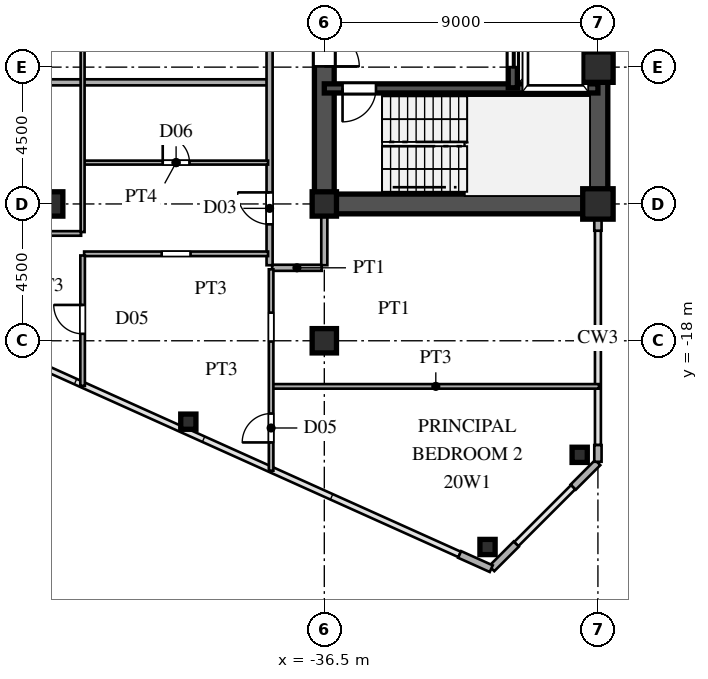
"""IFC4 building model, lengths in metres.
Left out: names, types, materials, properties, quantities, classifications, styles, units other than length and angle.
Written with IfcOpenShell. Run it as: python <this file> out.ifc"""

import sys

from ifc_helpers import new_model, si_unit, direction, frame, frame_2d, origin, origin_2d, place, context, subcontext, project, spatial, rectangle, hollow_rectangle, i_section, extrude, source, transform, mapped, element, fill, save


model = new_model("IFC4")
c1 = context("Model", 3, precision=1e-05, world=origin(), true_north=direction((0.0, 1.0)))
c2 = subcontext(c1, "Body", "Model", "MODEL_VIEW")
j1 = project(units=[si_unit("LENGTHUNIT", "METRE"), si_unit("PLANEANGLEUNIT", "RADIAN")], contexts=[c1])
p1 = place(None, origin())
s1 = spatial("IfcSite", under=j1, at=p1, CompositionType="ELEMENT")
p2 = place(p1, origin())
s2 = spatial("IfcBuilding", under=s1, at=p2, CompositionType="ELEMENT")
p3 = place(p2, frame((0.0, 0.0, 76.5)))
s3 = spatial("IfcBuildingStorey", under=s2, at=p3, CompositionType="ELEMENT", Elevation=76.5)
m1 = source(origin(), c2, "Body", "SweptSolid", [
    extrude(hollow_rectangle(XDim=1.0, YDim=1.0, WallThickness=0.042, at=origin_2d()), origin(), (0.0, 0.0, 1.0), 3.6),
])
for number, where, z_axis, x_axis in (
    (1, (-27.5, -13.5, 0.0), (0.0, 0.0, 1.0), (1.0, 0.0, 0.0)),
    (2, (-27.5, -9.0, 0.0), (0.0, 0.0, 1.0), (1.0, 0.0, 0.0)),
):
    element("IfcColumn", number, at=place(p3, frame(where, z_axis=z_axis, x_axis=x_axis)), inside=s3, PredefinedType="COLUMN", context=c2, shape_type="MappedRepresentation", body=[
        mapped(m1, transform((0.0, 0.0, 0.0), scale=1.0)),
    ])
m2 = source(origin(), c2, "Body", "SweptSolid", [
    extrude(i_section(OverallWidth=0.8, OverallDepth=0.8, WebThickness=0.032, FlangeThickness=0.05, at=origin_2d()), origin(), (0.0, 0.0, 1.0), 3.6),
])
for number, where, z_axis, x_axis in (
    (3, (-36.5, -18.0, 0.0), (0.0, 0.0, 1.0), (1.0, 0.0, 0.0)),
    (4, (-36.5, -13.5, 0.0), (0.0, 0.0, 1.0), (1.0, 0.0, 0.0)),
    (5, (-45.5, -13.5, 0.0), (0.0, 0.0, 1.0), (1.0, 0.0, 0.0)),
):
    element("IfcColumn", number, at=place(p3, frame(where, z_axis=z_axis, x_axis=x_axis)), inside=s3, PredefinedType="COLUMN", context=c2, shape_type="MappedRepresentation", body=[
        mapped(m2, transform((0.0, 0.0, 0.0), scale=1.0)),
    ])
m3 = source(origin(), c2, "Body", "SweptSolid", [
    extrude(hollow_rectangle(XDim=0.5, YDim=0.5, WallThickness=0.02, at=origin_2d()), origin(), (0.0, 0.0, 1.0), 3.6),
])
for number, where, z_axis, x_axis in (
    (6, (-28.1, -21.751, 0.0), (0.0, 0.0, 1.0), (1.0, 0.0, 0.0)),
    (7, (-31.131, -24.783, 0.0), (0.0, 0.0, 1.0), (1.0, 0.0, 0.0)),
    (8, (-40.973, -20.661, 0.0), (0.0, 0.0, 1.0), (1.0, 0.0, 0.0)),
):
    element("IfcColumn", number, at=place(p3, frame(where, z_axis=z_axis, x_axis=x_axis)), inside=s3, PredefinedType="COLUMN", context=c2, shape_type="MappedRepresentation", body=[
        mapped(m3, transform((0.0, 0.0, 0.0), scale=1.0)),
    ])
p4 = place(p3, frame((-27.5, -21.98, 0.0), z_axis=(0.0, 0.0, 1.0), x_axis=(0.0, 1.0, 0.0)))
e9 = element("IfcWall", 9, at=p4, inside=s3, PredefinedType="SOLIDWALL", context=c2, shape_type="SweptSolid", body=[
    extrude(rectangle(XDim=0.55, YDim=0.24, at=frame_2d((0.275, 0.0))), origin(), (0.0, 0.0, 1.0), 3.38),
])
p5 = place(p3, frame((-27.5, -14.38, 0.0), z_axis=(0.0, 0.0, 1.0), x_axis=(0.0, 1.0, 0.0)))
e10 = element("IfcWall", 10, at=p5, inside=s3, PredefinedType="SOLIDWALL", context=c2, shape_type="SweptSolid", body=[
    extrude(rectangle(XDim=0.55, YDim=0.24, at=frame_2d((0.275, 0.0))), origin(), (0.0, 0.0, 1.0), 2.88),
])
p6 = place(p3, frame((-32.049, -25.028, 0.0), z_axis=(0.0, 0.0, 1.0), x_axis=(0.911929519623, -0.410346866979, 0.0)))
e11 = element("IfcWall", 11, at=p6, inside=s3, PredefinedType="SOLIDWALL", context=c2, shape_type="SweptSolid", body=[
    extrude(rectangle(XDim=1.14, YDim=0.24, at=frame_2d((0.57, 0.0))), origin(), (0.0, 0.0, 1.0), 3.38),
])
for number, where, z_axis, x_axis in (
    (12, (-30.993, -25.493, 0.0), (0.0, 0.0, 1.0), (0.707, 0.707, 0.0)),
    (13, (-28.313, -22.813, 0.0), (0.0, 0.0, 1.0), (0.707, 0.707, 0.0)),
):
    element("IfcWall", number, at=place(p3, frame(where, z_axis=z_axis, x_axis=x_axis)), inside=s3, PredefinedType="SOLIDWALL", context=c2, shape_type="SweptSolid", body=[
        extrude(rectangle(XDim=1.14, YDim=0.24, at=frame_2d((0.57, 0.0))), origin(), (0.0, 0.0, 1.0), 3.38),
    ])
p7 = place(p3, frame((-27.5, -13.5, 0.0), z_axis=(0.0, 0.0, 1.0), x_axis=(0.0, 1.0, 0.0)))
e14 = element("IfcWall", 14, at=p7, inside=s3, PredefinedType="SHEAR", context=c2, shape_type="SweptSolid", body=[
    extrude(rectangle(XDim=12.2, YDim=0.65, at=frame_2d((6.1, 0.0))), origin(), (0.0, 0.0, 1.0), 3.38),
])
p8 = place(p3, frame((-36.5, -13.5, 0.0), z_axis=(0.0, 0.0, 1.0), x_axis=(1.0, 0.0, 0.0)))
e15 = element("IfcWall", 15, at=p8, inside=s3, PredefinedType="SHEAR", context=c2, shape_type="SweptSolid", body=[
    extrude(rectangle(XDim=9.0, YDim=0.65, at=frame_2d((4.5, 0.0))), origin(), (0.0, 0.0, 1.0), 3.38),
])
p9 = place(p3, frame((-36.5, -13.65, 0.0), z_axis=(0.0, 0.0, 1.0), x_axis=(0.0, 1.0, 0.0)))
e16 = element("IfcWall", 16, at=p9, inside=s3, PredefinedType="SHEAR", context=c2, shape_type="SweptSolid", body=[
    extrude(rectangle(XDim=7.15, YDim=0.65, at=frame_2d((3.575, 0.0))), origin(), (0.0, 0.0, 1.0), 3.38),
])
p10 = place(p9, frame((4.675, 0.0, 0.0)))
e17 = element("IfcOpeningElement", 17, at=p10, cuts=e16, PredefinedType="OPENING", context=c2, shape_type="SweptSolid", body=[
    extrude(rectangle(XDim=1.15, YDim=2.2, at=frame_2d((0.575, 1.1))), frame((0.0, 0.335, 0.0), z_axis=(0.0, -1.0, 0.0), x_axis=(1.0, 0.0, 0.0)), (0.0, 0.0, 1.0), 0.67),
])
p11 = place(p3, frame((-36.5, -9.7, 0.0), z_axis=(0.0, 0.0, 1.0), x_axis=(1.0, 0.0, 0.0)))
e18 = element("IfcWall", 18, at=p11, inside=s3, PredefinedType="SHEAR", context=c2, shape_type="SweptSolid", body=[
    extrude(rectangle(XDim=9.0, YDim=0.3, at=frame_2d((4.5, 0.0))), origin(), (0.0, 0.0, 1.0), 3.38),
])
p12 = place(p11, frame((0.6, 0.0, 0.0)))
e19 = element("IfcOpeningElement", 19, at=p12, cuts=e18, PredefinedType="OPENING", context=c2, shape_type="SweptSolid", body=[
    extrude(rectangle(XDim=1.1, YDim=2.2, at=frame_2d((0.55, 1.1))), frame((0.0, 0.16, 0.0), z_axis=(0.0, -1.0, 0.0), x_axis=(1.0, 0.0, 0.0)), (0.0, 0.0, 1.0), 0.32),
])
p13 = place(p3, frame((-30.3, -9.68, 0.0), z_axis=(0.0, 0.0, 1.0), x_axis=(0.0, 1.0, 0.0)))
e20 = element("IfcWall", 20, at=p13, inside=s3, PredefinedType="SHEAR", context=c2, shape_type="SweptSolid", body=[
    extrude(rectangle(XDim=2.56, YDim=0.3, at=frame_2d((1.28, 0.0))), origin(), (0.0, 0.0, 1.0), 3.38),
])
p14 = place(p13, frame((0.68, 0.0, 0.0)))
e21 = element("IfcOpeningElement", 21, at=p14, cuts=e20, PredefinedType="OPENING", context=c2, shape_type="SweptSolid", body=[
    extrude(rectangle(XDim=1.2, YDim=2.25, at=frame_2d((0.6, 1.125))), frame((0.0, 0.16, 0.0), z_axis=(0.0, -1.0, 0.0), x_axis=(1.0, 0.0, 0.0)), (0.0, 0.0, 1.0), 0.32),
])
p15 = place(p3, frame((-38.2, -19.5, 0.0), z_axis=(0.0, 0.0, 1.0), x_axis=(1.0, 0.0, 0.0)))
e22 = element("IfcWall", 22, at=p15, inside=s3, PredefinedType="PARTITIONING", context=c2, shape_type="SweptSolid", body=[
    extrude(rectangle(XDim=10.735, YDim=0.15, at=frame_2d((5.367, 0.0))), origin(), (0.0, 0.0, 1.0), 3.38),
])
p16 = place(p3, frame((-38.215, -15.6, 0.0), z_axis=(0.0, 0.0, 1.0), x_axis=(1.0, 0.0, 0.0)))
e23 = element("IfcWall", 23, at=p16, inside=s3, PredefinedType="PARTITIONING", context=c2, shape_type="SweptSolid", body=[
    extrude(rectangle(XDim=1.63, YDim=0.2, at=frame_2d((0.815, 0.0))), origin(), (0.0, 0.0, 1.0), 3.38),
])
p17 = place(p3, frame((-44.4, -15.14, 0.0), z_axis=(0.0, 0.0, 1.0), x_axis=(1.0, 0.0, 0.0)))
e24 = element("IfcWall", 24, at=p17, inside=s3, PredefinedType="PARTITIONING", context=c2, shape_type="SweptSolid", body=[
    extrude(rectangle(XDim=6.05, YDim=0.15, at=frame_2d((3.025, 0.0))), origin(), (0.0, 0.0, 1.0), 3.38),
])
p18 = place(p17, frame((2.55, 0.0, 0.0)))
e25 = element("IfcOpeningElement", 25, at=p18, cuts=e24, PredefinedType="OPENING", context=c2, shape_type="SweptSolid", body=[
    extrude(rectangle(XDim=0.95, YDim=2.15, at=frame_2d((0.475, 1.075))), frame((0.0, 0.085, 0.0), z_axis=(0.0, -1.0, 0.0), x_axis=(1.0, 0.0, 0.0)), (0.0, 0.0, 1.0), 0.17),
])
p19 = place(p3, frame((-54.45, -14.47, 0.0), z_axis=(0.0, 0.0, 1.0), x_axis=(1.0, 0.0, 0.0)))
e26 = element("IfcWall", 26, at=p19, inside=s3, PredefinedType="PARTITIONING", context=c2, shape_type="SweptSolid", body=[
    extrude(rectangle(XDim=9.95, YDim=0.15, at=frame_2d((4.975, 0.0))), origin(), (0.0, 0.0, 1.0), 3.38),
])
p20 = place(p19, frame((4.5, 0.0, 0.0)))
e27 = element("IfcOpeningElement", 27, at=p20, cuts=e26, PredefinedType="OPENING", context=c2, shape_type="SweptSolid", body=[
    extrude(rectangle(XDim=0.95, YDim=2.15, at=frame_2d((0.475, 1.075))), frame((0.0, 0.085, 0.0), z_axis=(0.0, -1.0, 0.0), x_axis=(1.0, 0.0, 0.0)), (0.0, 0.0, 1.0), 0.17),
])
p21 = place(p3, frame((-44.4, -12.14, 0.0), z_axis=(0.0, 0.0, 1.0), x_axis=(1.0, 0.0, 0.0)))
e28 = element("IfcWall", 28, at=p21, inside=s3, PredefinedType="PARTITIONING", context=c2, shape_type="SweptSolid", body=[
    extrude(rectangle(XDim=6.05, YDim=0.13, at=frame_2d((3.025, 0.0))), origin(), (0.0, 0.0, 1.0), 3.38),
])
p22 = place(p21, frame((2.585, 0.0, 0.0)))
e29 = element("IfcOpeningElement", 29, at=p22, cuts=e28, PredefinedType="OPENING", context=c2, shape_type="SweptSolid", body=[
    extrude(rectangle(XDim=0.88, YDim=2.1, at=frame_2d((0.44, 1.05))), frame((0.0, 0.075, 0.0), z_axis=(0.0, -1.0, 0.0), x_axis=(1.0, 0.0, 0.0)), (0.0, 0.0, 1.0), 0.15),
])
p23 = place(p3, frame((-66.568, -9.5, 0.0), z_axis=(0.0, 0.0, 1.0), x_axis=(1.0, 0.0, 0.0)))
e30 = element("IfcWall", 30, at=p23, inside=s3, PredefinedType="PARTITIONING", context=c2, shape_type="SweptSolid", body=[
    extrude(rectangle(XDim=28.188, YDim=0.2, at=frame_2d((14.094, 0.0))), origin(), (0.0, 0.0, 1.0), 3.38),
])
p24 = place(p3, frame((-44.45, -19.483, 0.0), z_axis=(0.0, 0.0, 1.0), x_axis=(0.0, 1.0, 0.0)))
e31 = element("IfcWall", 31, at=p24, inside=s3, PredefinedType="PARTITIONING", context=c2, shape_type="SweptSolid", body=[
    extrude(rectangle(XDim=4.288, YDim=0.15, at=frame_2d((2.144, 0.0))), origin(), (0.0, 0.0, 1.0), 3.38),
])
p25 = place(p24, frame((1.712, 0.0, 0.0)))
e32 = element("IfcOpeningElement", 32, at=p25, cuts=e31, PredefinedType="OPENING", context=c2, shape_type="SweptSolid", body=[
    extrude(rectangle(XDim=0.95, YDim=2.15, at=frame_2d((0.475, 1.075))), frame((0.0, 0.085, 0.0), z_axis=(0.0, -1.0, 0.0), x_axis=(1.0, 0.0, 0.0)), (0.0, 0.0, 1.0), 0.17),
])
p26 = place(p3, frame((-44.45, -14.424, 0.0), z_axis=(0.0, 0.0, 1.0), x_axis=(0.0, 1.0, 0.0)))
e33 = element("IfcWall", 33, at=p26, inside=s3, PredefinedType="PARTITIONING", context=c2, shape_type="SweptSolid", body=[
    extrude(rectangle(XDim=14.207, YDim=0.13, at=frame_2d((7.104, 0.0))), origin(), (0.0, 0.0, 1.0), 3.38),
])
p27 = place(p26, frame((11.449, 0.0, 0.0)))
e34 = element("IfcOpeningElement", 34, at=p27, cuts=e33, PredefinedType="OPENING", context=c2, shape_type="SweptSolid", body=[
    extrude(rectangle(XDim=0.95, YDim=2.15, at=frame_2d((0.475, 1.075))), frame((0.0, 0.075, 0.0), z_axis=(0.0, -1.0, 0.0), x_axis=(1.0, 0.0, 0.0)), (0.0, 0.0, 1.0), 0.15),
])
p28 = place(p3, frame((-38.3, -15.515, 0.0), z_axis=(0.0, 0.0, 1.0), x_axis=(0.0, 1.0, 0.0)))
e35 = element("IfcWall", 35, at=p28, inside=s3, PredefinedType="PARTITIONING", context=c2, shape_type="SweptSolid", body=[
    extrude(rectangle(XDim=31.03, YDim=0.2, at=frame_2d((15.515, 0.0))), origin(), (0.0, 0.0, 1.0), 3.38),
])
p29 = place(p28, frame((1.345, 0.0, 0.0)))
e36 = element("IfcOpeningElement", 36, at=p29, cuts=e35, PredefinedType="OPENING", context=c2, shape_type="SweptSolid", body=[
    extrude(rectangle(XDim=1.05, YDim=2.25, at=frame_2d((0.525, 1.125))), frame((0.0, 0.11, 0.0), z_axis=(0.0, -1.0, 0.0), x_axis=(1.0, 0.0, 0.0)), (0.0, 0.0, 1.0), 0.22),
])
p30 = place(p28, frame((12.28, 0.0, 0.0)))
e37 = element("IfcOpeningElement", 37, at=p30, cuts=e35, PredefinedType="OPENING", context=c2, shape_type="SweptSolid", body=[
    extrude(rectangle(XDim=1.05, YDim=2.25, at=frame_2d((0.525, 1.125))), frame((0.0, 0.11, 0.0), z_axis=(0.0, -1.0, 0.0), x_axis=(1.0, 0.0, 0.0)), (0.0, 0.0, 1.0), 0.22),
])
p31 = place(p28, frame((25.067, 0.0, 0.0)))
e38 = element("IfcOpeningElement", 38, at=p31, cuts=e35, PredefinedType="OPENING", context=c2, shape_type="SweptSolid", body=[
    extrude(rectangle(XDim=1.05, YDim=2.25, at=frame_2d((0.525, 1.125))), frame((0.0, 0.11, 0.0), z_axis=(0.0, -1.0, 0.0), x_axis=(1.0, 0.0, 0.0)), (0.0, 0.0, 1.0), 0.22),
])
p32 = place(p3, frame((-38.25, -22.273, 0.0), z_axis=(0.0, 0.0, 1.0), x_axis=(0.0, 1.0, 0.0)))
e39 = element("IfcWall", 39, at=p32, inside=s3, PredefinedType="PARTITIONING", context=c2, shape_type="SweptSolid", body=[
    extrude(rectangle(XDim=6.623, YDim=0.15, at=frame_2d((3.312, 0.0))), origin(), (0.0, 0.0, 1.0), 3.38),
])
p33 = place(p32, frame((0.929, 0.0, 0.0)))
e40 = element("IfcOpeningElement", 40, at=p33, cuts=e39, PredefinedType="OPENING", context=c2, shape_type="SweptSolid", body=[
    extrude(rectangle(XDim=0.95, YDim=2.15, at=frame_2d((0.475, 1.075))), frame((0.0, 0.085, 0.0), z_axis=(0.0, -1.0, 0.0), x_axis=(1.0, 0.0, 0.0)), (0.0, 0.0, 1.0), 0.17),
])
p34 = place(p32, frame((4.248, 0.0, 0.0)))
e41 = element("IfcOpeningElement", 41, at=p34, cuts=e39, PredefinedType="OPENING", context=c2, shape_type="SweptSolid", body=[
    extrude(rectangle(XDim=0.95, YDim=2.15, at=frame_2d((0.475, 1.075))), frame((0.0, 0.085, 0.0), z_axis=(0.0, -1.0, 0.0), x_axis=(1.0, 0.0, 0.0)), (0.0, 0.0, 1.0), 0.17),
])
p35 = place(p3, frame((-36.5, -15.515, 0.0), z_axis=(0.0, 0.0, 1.0), x_axis=(0.0, 1.0, 0.0)))
e42 = element("IfcWall", 42, at=p35, inside=s3, PredefinedType="PARTITIONING", context=c2, shape_type="SweptSolid", body=[
    extrude(rectangle(XDim=1.685, YDim=0.2, at=frame_2d((0.842, 0.0))), origin(), (0.0, 0.0, 1.0), 2.68),
])
m4 = source(origin(), c2, "Body", "SweptSolid", [
    extrude(rectangle(XDim=1.15, YDim=2.2, at=frame_2d((0.575, 1.1))), frame((0.0, 0.025, 0.0), z_axis=(0.0, -1.0, 0.0), x_axis=(1.0, 0.0, 0.0)), (0.0, 0.0, 1.0), 0.05),
])
p36 = place(p10, frame((1.15, 0.0, 0.0), z_axis=(0.0, 0.0, 1.0), x_axis=(-1.0, 0.0, 0.0)))
e43 = element("IfcDoor", 43, at=p36, inside=s3, OperationType="SINGLE_SWING_LEFT", PredefinedType="DOOR", context=c2, shape_type="MappedRepresentation", body=[
    mapped(m4, transform((0.0, 0.0, 0.0), scale=1.0)),
])
fill(e17, e43)
m5 = source(origin(), c2, "Body", "SweptSolid", [
    extrude(rectangle(XDim=1.1, YDim=2.2, at=frame_2d((0.55, 1.1))), frame((0.0, 0.025, 0.0), z_axis=(0.0, -1.0, 0.0), x_axis=(1.0, 0.0, 0.0)), (0.0, 0.0, 1.0), 0.05),
])
p37 = place(p12, frame((1.1, 0.0, 0.0), z_axis=(0.0, 0.0, 1.0), x_axis=(-1.0, 0.0, 0.0)))
e44 = element("IfcDoor", 44, at=p37, inside=s3, OperationType="SINGLE_SWING_LEFT", PredefinedType="DOOR", context=c2, shape_type="MappedRepresentation", body=[
    mapped(m5, transform((0.0, 0.0, 0.0), scale=1.0)),
])
fill(e19, e44)
m6 = source(origin(), c2, "Body", "SweptSolid", [
    extrude(rectangle(XDim=1.2, YDim=2.25, at=frame_2d((0.6, 1.125))), frame((0.0, 0.025, 0.0), z_axis=(0.0, -1.0, 0.0), x_axis=(1.0, 0.0, 0.0)), (0.0, 0.0, 1.0), 0.05),
])
p38 = place(p14, origin())
e45 = element("IfcDoor", 45, at=p38, inside=s3, OperationType="DOUBLE_DOOR_SLIDING", PredefinedType="DOOR", context=c2, shape_type="MappedRepresentation", body=[
    mapped(m6, transform((0.0, 0.0, 0.0), scale=1.0)),
])
fill(e21, e45)
m7 = source(origin(), c2, "Body", "SweptSolid", [
    extrude(rectangle(XDim=0.88, YDim=2.1, at=frame_2d((0.44, 1.05))), frame((0.0, 0.025, 0.0), z_axis=(0.0, -1.0, 0.0), x_axis=(1.0, 0.0, 0.0)), (0.0, 0.0, 1.0), 0.05),
])
p39 = place(p22, origin())
e46 = element("IfcDoor", 46, at=p39, inside=s3, OperationType="SINGLE_SWING_LEFT", PredefinedType="DOOR", context=c2, shape_type="MappedRepresentation", body=[
    mapped(m7, transform((0.0, 0.0, 0.0), scale=1.0)),
])
fill(e29, e46)
m8 = source(origin(), c2, "Body", "SweptSolid", [
    extrude(rectangle(XDim=0.95, YDim=2.15, at=frame_2d((0.475, 1.075))), frame((0.0, 0.025, 0.0), z_axis=(0.0, -1.0, 0.0), x_axis=(1.0, 0.0, 0.0)), (0.0, 0.0, 1.0), 0.05),
])
p40 = place(p25, origin())
e47 = element("IfcDoor", 47, at=p40, inside=s3, OperationType="SINGLE_SWING_RIGHT", PredefinedType="DOOR", context=c2, shape_type="MappedRepresentation", body=[
    mapped(m8, transform((0.0, 0.0, 0.0), scale=1.0)),
])
fill(e32, e47)
m9 = source(origin(), c2, "Body", "SweptSolid", [
    extrude(rectangle(XDim=1.05, YDim=2.25, at=frame_2d((0.525, 1.125))), frame((0.0, 0.025, 0.0), z_axis=(0.0, -1.0, 0.0), x_axis=(1.0, 0.0, 0.0)), (0.0, 0.0, 1.0), 0.05),
])
p41 = place(p29, origin())
e48 = element("IfcDoor", 48, at=p41, inside=s3, OperationType="SINGLE_SWING_RIGHT", PredefinedType="DOOR", context=c2, shape_type="MappedRepresentation", body=[
    mapped(m9, transform((0.0, 0.0, 0.0), scale=1.0)),
])
fill(e36, e48)
p42 = place(p33, origin())
e49 = element("IfcDoor", 49, at=p42, inside=s3, OperationType="SINGLE_SWING_LEFT", PredefinedType="DOOR", context=c2, shape_type="MappedRepresentation", body=[
    mapped(m8, transform((0.0, 0.0, 0.0), scale=1.0)),
])
fill(e40, e49)
save(model, sys.argv[1])
